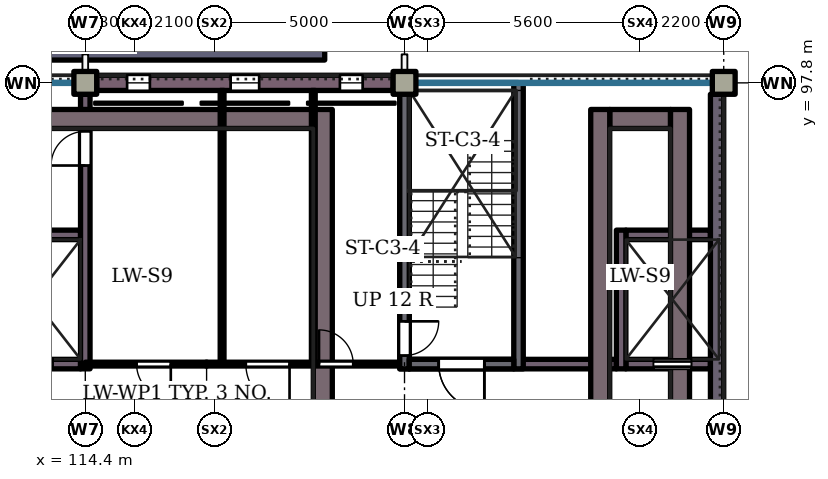
"""IFC4 building model, lengths in metres.
Left out: names, types, materials, properties, quantities, classifications, styles, units other than length and angle.
Written with IfcOpenShell. Run it as: python <this file> out.ifc"""

import sys

from ifc_helpers import new_model, si_unit, direction, frame, frame_2d, origin, origin_2d, place, context, subcontext, project, spatial, rectangle, extrude, element, fill, save


model = new_model("IFC4")
c1 = context("Model", 3, precision=1e-05, world=origin(), true_north=direction((0.0, 1.0)))
c2 = subcontext(c1, "Body", "Model", "MODEL_VIEW")
j1 = project(units=[si_unit("LENGTHUNIT", "METRE"), si_unit("PLANEANGLEUNIT", "RADIAN")], contexts=[c1])
p1 = place(None, origin())
s1 = spatial("IfcSite", under=j1, at=p1, CompositionType="ELEMENT")
p2 = place(p1, origin())
s2 = spatial("IfcBuilding", under=s1, at=p2, CompositionType="ELEMENT")
p3 = place(p2, frame((0.0, 0.0, 16.8)))
s3 = spatial("IfcBuildingStorey", under=s2, at=p3, CompositionType="ELEMENT", Elevation=16.8)
for number, where, z_axis, x_axis in (
    (1, (114.4, 97.8, 0.0), (0.0, 0.0, 1.0), (1.0, 0.0, 0.0)),
    (2, (122.8, 97.8, 0.0), (0.0, 0.0, 1.0), (1.0, 0.0, 0.0)),
    (3, (131.2, 97.8, 0.0), (0.0, 0.0, 1.0), (1.0, 0.0, 0.0)),
):
    element("IfcColumn", number, at=place(p3, frame(where, z_axis=z_axis, x_axis=x_axis)), inside=s3, PredefinedType="COLUMN", context=c2, shape_type="SweptSolid", body=[
        extrude(rectangle(XDim=0.6, YDim=0.6, at=origin_2d()), origin(), (0.0, 0.0, 1.0), 4.2),
    ])
p4 = place(p3, frame((111.825, 90.4, 0.0), z_axis=(0.0, 0.0, 1.0), x_axis=(1.0, 0.0, 0.0)))
e4 = element("IfcWall", 4, at=p4, inside=s3, PredefinedType="SHEAR", context=c2, shape_type="SweptSolid", body=[
    extrude(rectangle(XDim=2.45, YDim=0.25, at=frame_2d((1.225, 0.0))), origin(), (0.0, 0.0, 1.0), 4.2),
])
p5 = place(p4, frame((0.725, 0.0, 0.0)))
e5 = element("IfcOpeningElement", 5, at=p5, cuts=e4, PredefinedType="OPENING", context=c2, shape_type="SweptSolid", body=[
    extrude(rectangle(XDim=1.0, YDim=2.1, at=frame_2d((0.5, 1.05))), frame((0.0, 0.135, 0.0), z_axis=(0.0, -1.0, 0.0), x_axis=(1.0, 0.0, 0.0)), (0.0, 0.0, 1.0), 0.27),
])
p6 = place(p3, frame((122.925, 90.4, 0.0), z_axis=(0.0, 0.0, 1.0), x_axis=(1.0, 0.0, 0.0)))
e6 = element("IfcWall", 6, at=p6, inside=s3, PredefinedType="SHEAR", context=c2, shape_type="SweptSolid", body=[
    extrude(rectangle(XDim=5.45, YDim=0.25, at=frame_2d((2.725, 0.0))), origin(), (0.0, 0.0, 1.0), 4.2),
])
p7 = place(p6, frame((0.775, 0.0, 0.0)))
e7 = element("IfcOpeningElement", 7, at=p7, cuts=e6, PredefinedType="OPENING", context=c2, shape_type="SweptSolid", body=[
    extrude(rectangle(XDim=1.2, YDim=2.1, at=frame_2d((0.6, 1.05))), frame((0.0, 0.135, 0.0), z_axis=(0.0, -1.0, 0.0), x_axis=(1.0, 0.0, 0.0)), (0.0, 0.0, 1.0), 0.27),
])
p8 = place(p3, frame((128.625, 90.4, 0.0), z_axis=(0.0, 0.0, 1.0), x_axis=(1.0, 0.0, 0.0)))
e8 = element("IfcWall", 8, at=p8, inside=s3, PredefinedType="SHEAR", context=c2, shape_type="SweptSolid", body=[
    extrude(rectangle(XDim=2.225, YDim=0.25, at=frame_2d((1.113, 0.0))), origin(), (0.0, 0.0, 1.0), 4.2),
])
p9 = place(p8, frame((0.725, 0.0, 0.0)))
e9 = element("IfcOpeningElement", 9, at=p9, cuts=e8, PredefinedType="OPENING", context=c2, shape_type="SweptSolid", body=[
    extrude(rectangle(XDim=1.0, YDim=2.1, at=frame_2d((0.5, 1.05))), frame((0.0, 0.135, 0.0), z_axis=(0.0, -1.0, 0.0), x_axis=(1.0, 0.0, 0.0)), (0.0, 0.0, 1.0), 0.27),
])
p10 = place(p3, frame((111.825, 93.8, 0.0), z_axis=(0.0, 0.0, 1.0), x_axis=(1.0, 0.0, 0.0)))
e10 = element("IfcWall", 10, at=p10, inside=s3, PredefinedType="SHEAR", context=c2, shape_type="SweptSolid", body=[
    extrude(rectangle(XDim=2.45, YDim=0.25, at=frame_2d((1.225, 0.0))), origin(), (0.0, 0.0, 1.0), 4.2),
])
p11 = place(p3, frame((128.625, 93.8, 0.0), z_axis=(0.0, 0.0, 1.0), x_axis=(1.0, 0.0, 0.0)))
e11 = element("IfcWall", 11, at=p11, inside=s3, PredefinedType="SHEAR", context=c2, shape_type="SweptSolid", body=[
    extrude(rectangle(XDim=2.225, YDim=0.25, at=frame_2d((1.113, 0.0))), origin(), (0.0, 0.0, 1.0), 4.2),
])
p12 = place(p3, frame((114.4, 90.275, 0.0), z_axis=(0.0, 0.0, 1.0), x_axis=(0.0, 1.0, 0.0)))
e12 = element("IfcWall", 12, at=p12, inside=s3, PredefinedType="SHEAR", context=c2, shape_type="SweptSolid", body=[
    extrude(rectangle(XDim=7.225, YDim=0.25, at=frame_2d((3.613, 0.0))), origin(), (0.0, 0.0, 1.0), 4.2),
])
p13 = place(p12, frame((5.35, 0.0, 0.0)))
e13 = element("IfcOpeningElement", 13, at=p13, cuts=e12, PredefinedType="OPENING", context=c2, shape_type="SweptSolid", body=[
    extrude(rectangle(XDim=0.9, YDim=2.1, at=frame_2d((0.45, 1.05))), frame((0.0, 0.135, 0.0), z_axis=(0.0, -1.0, 0.0), x_axis=(1.0, 0.0, 0.0)), (0.0, 0.0, 1.0), 0.27),
])
p14 = place(p3, frame((122.8, 90.275, 0.0), z_axis=(0.0, 0.0, 1.0), x_axis=(0.0, 1.0, 0.0)))
e14 = element("IfcWall", 14, at=p14, inside=s3, PredefinedType="SHEAR", context=c2, shape_type="SweptSolid", body=[
    extrude(rectangle(XDim=7.225, YDim=0.25, at=frame_2d((3.613, 0.0))), origin(), (0.0, 0.0, 1.0), 4.2),
])
p15 = place(p14, frame((0.35, 0.0, 0.0)))
e15 = element("IfcOpeningElement", 15, at=p15, cuts=e14, PredefinedType="OPENING", context=c2, shape_type="SweptSolid", body=[
    extrude(rectangle(XDim=0.9, YDim=2.1, at=frame_2d((0.45, 1.05))), frame((0.0, 0.135, 0.0), z_axis=(0.0, -1.0, 0.0), x_axis=(1.0, 0.0, 0.0)), (0.0, 0.0, 1.0), 0.27),
])
p16 = place(p3, frame((128.5, 90.275, 0.0), z_axis=(0.0, 0.0, 1.0), x_axis=(0.0, 1.0, 0.0)))
e16 = element("IfcWall", 16, at=p16, inside=s3, PredefinedType="SHEAR", context=c2, shape_type="SweptSolid", body=[
    extrude(rectangle(XDim=3.65, YDim=0.25, at=frame_2d((1.825, 0.0))), origin(), (0.0, 0.0, 1.0), 4.2),
])
p17 = place(p3, frame((131.025, 97.5, 0.0), z_axis=(0.0, 0.0, 1.0), x_axis=(0.0, -1.0, 0.0)))
e17 = element("IfcWall", 17, at=p17, inside=s3, PredefinedType="SHEAR", context=c2, shape_type="SweptSolid", body=[
    extrude(rectangle(XDim=9.6, YDim=0.35, at=frame_2d((4.8, 0.0))), origin(), (0.0, 0.0, 1.0), 4.2),
])
p18 = place(p3, frame((114.7, 97.8, 0.0), z_axis=(0.0, 0.0, 1.0), x_axis=(1.0, 0.0, 0.0)))
e18 = element("IfcWall", 18, at=p18, inside=s3, PredefinedType="SOLIDWALL", context=c2, shape_type="SweptSolid", body=[
    extrude(rectangle(XDim=7.8, YDim=0.4, at=frame_2d((3.9, 0.0))), origin(), (0.0, 0.0, 1.0), 3.3),
])
p19 = place(p18, frame((0.8, 0.0, 2.1)))
e19 = element("IfcOpeningElement", 19, at=p19, cuts=e18, PredefinedType="OPENING", context=c2, shape_type="SweptSolid", body=[
    extrude(rectangle(XDim=0.6, YDim=0.9, at=frame_2d((0.3, 0.45))), frame((0.0, 0.21, 0.0), z_axis=(0.0, -1.0, 0.0), x_axis=(1.0, 0.0, 0.0)), (0.0, 0.0, 1.0), 0.42),
])
p20 = place(p18, frame((3.525, 0.0, 2.1)))
e20 = element("IfcOpeningElement", 20, at=p20, cuts=e18, PredefinedType="OPENING", context=c2, shape_type="SweptSolid", body=[
    extrude(rectangle(XDim=0.75, YDim=0.9, at=frame_2d((0.375, 0.45))), frame((0.0, 0.21, 0.0), z_axis=(0.0, -1.0, 0.0), x_axis=(1.0, 0.0, 0.0)), (0.0, 0.0, 1.0), 0.42),
])
p21 = place(p18, frame((6.4, 0.0, 2.1)))
e21 = element("IfcOpeningElement", 21, at=p21, cuts=e18, PredefinedType="OPENING", context=c2, shape_type="SweptSolid", body=[
    extrude(rectangle(XDim=0.6, YDim=0.9, at=frame_2d((0.3, 0.45))), frame((0.0, 0.21, 0.0), z_axis=(0.0, -1.0, 0.0), x_axis=(1.0, 0.0, 0.0)), (0.0, 0.0, 1.0), 0.42),
])
p22 = place(p3, frame((128.2, 96.85, 4.2), z_axis=(0.0, 0.0, 1.0), x_axis=(1.0, 0.0, 0.0)))
e22 = element("IfcWall", 22, at=p22, inside=s3, PredefinedType="SOLIDWALL", context=c2, shape_type="SweptSolid", body=[
    extrude(rectangle(XDim=1.6, YDim=0.5, at=frame_2d((0.8, 0.0))), origin(), (0.0, 0.0, 1.0), 0.9),
])
for number, where, z_axis, x_axis in (
    (23, (127.95, 88.3, 4.2), (0.0, 0.0, 1.0), (0.0, 1.0, 0.0)),
    (24, (130.05, 88.3, 4.2), (0.0, 0.0, 1.0), (0.0, 1.0, 0.0)),
):
    element("IfcWall", number, at=place(p3, frame(where, z_axis=z_axis, x_axis=x_axis)), inside=s3, PredefinedType="SOLIDWALL", context=c2, shape_type="SweptSolid", body=[
        extrude(rectangle(XDim=8.8, YDim=0.5, at=frame_2d((4.4, 0.0))), origin(), (0.0, 0.0, 1.0), 0.9),
    ])
p23 = place(p3, frame((111.4, 96.85, 4.2), z_axis=(0.0, 0.0, 1.0), x_axis=(1.0, 0.0, 0.0)))
e25 = element("IfcWall", 25, at=p23, inside=s3, PredefinedType="SOLIDWALL", context=c2, shape_type="SweptSolid", body=[
    extrude(rectangle(XDim=9.0, YDim=0.5, at=frame_2d((4.5, 0.0))), origin(), (0.0, 0.0, 1.0), 0.9),
])
p24 = place(p3, frame((120.65, 88.3, 4.2), z_axis=(0.0, 0.0, 1.0), x_axis=(0.0, 1.0, 0.0)))
e26 = element("IfcWall", 26, at=p24, inside=s3, PredefinedType="SOLIDWALL", context=c2, shape_type="SweptSolid", body=[
    extrude(rectangle(XDim=8.8, YDim=0.5, at=frame_2d((4.4, 0.0))), origin(), (0.0, 0.0, 1.0), 0.9),
])
p25 = place(p3, frame((108.1, 98.9, 0.0), z_axis=(0.0, 0.0, 1.0), x_axis=(1.0, 0.0, 0.0)))
e27 = element("IfcWall", 27, at=p25, inside=s3, PredefinedType="STANDARD", context=c2, shape_type="SweptSolid", body=[
    extrude(rectangle(XDim=12.6, YDim=1.0, at=frame_2d((6.3, 0.0))), origin(), (0.0, 0.0, 1.0), 0.6),
])
p26 = place(p3, frame((114.4, 90.4, 0.0), z_axis=(0.0, 0.0, 1.0), x_axis=(1.0, 0.0, 0.0)))
e28 = element("IfcWall", 28, at=p26, inside=s3, PredefinedType="PARTITIONING", context=c2, shape_type="SweptSolid", body=[
    extrude(rectangle(XDim=8.4, YDim=0.1, at=frame_2d((4.2, 0.0))), origin(), (0.0, 0.0, 1.0), 3.9),
])
p27 = place(p26, frame((1.35, 0.0, 0.0)))
e29 = element("IfcOpeningElement", 29, at=p27, cuts=e28, PredefinedType="OPENING", context=c2, shape_type="SweptSolid", body=[
    extrude(rectangle(XDim=0.9, YDim=2.1, at=frame_2d((0.45, 1.05))), frame((0.0, 0.06, 0.0), z_axis=(0.0, -1.0, 0.0), x_axis=(1.0, 0.0, 0.0)), (0.0, 0.0, 1.0), 0.12),
])
p28 = place(p26, frame((4.225, 0.0, 0.0)))
e30 = element("IfcOpeningElement", 30, at=p28, cuts=e28, PredefinedType="OPENING", context=c2, shape_type="SweptSolid", body=[
    extrude(rectangle(XDim=1.15, YDim=2.1, at=frame_2d((0.575, 1.05))), frame((0.0, 0.06, 0.0), z_axis=(0.0, -1.0, 0.0), x_axis=(1.0, 0.0, 0.0)), (0.0, 0.0, 1.0), 0.12),
])
p29 = place(p26, frame((6.15, 0.0, 0.0)))
e31 = element("IfcOpeningElement", 31, at=p29, cuts=e28, PredefinedType="OPENING", context=c2, shape_type="SweptSolid", body=[
    extrude(rectangle(XDim=0.9, YDim=2.1, at=frame_2d((0.45, 1.05))), frame((0.0, 0.06, 0.0), z_axis=(0.0, -1.0, 0.0), x_axis=(1.0, 0.0, 0.0)), (0.0, 0.0, 1.0), 0.12),
])
for number, where, z_axis, x_axis in (
    (32, (118.0, 90.4, 0.0), (0.0, 0.0, 1.0), (0.0, 1.0, 0.0)),
    (33, (120.4, 90.4, 0.0), (0.0, 0.0, 1.0), (0.0, 1.0, 0.0)),
):
    element("IfcWall", number, at=place(p3, frame(where, z_axis=z_axis, x_axis=x_axis)), inside=s3, PredefinedType="PARTITIONING", context=c2, shape_type="SweptSolid", body=[
        extrude(rectangle(XDim=7.2, YDim=0.1, at=frame_2d((3.6, 0.0))), origin(), (0.0, 0.0, 1.0), 3.9),
    ])
p30 = place(p3, frame((125.8, 93.2, 0.0), z_axis=(0.0, 0.0, 1.0), x_axis=(0.0, 1.0, 0.0)))
e34 = element("IfcWall", 34, at=p30, inside=s3, PredefinedType="PARTITIONING", context=c2, shape_type="SweptSolid", body=[
    extrude(rectangle(XDim=4.4, YDim=0.15, at=frame_2d((2.2, 0.0))), origin(), (0.0, 0.0, 1.0), 3.9),
])
for number, where, z_axis, x_axis in (
    (35, (122.8, 90.275, 4.2), (0.0, 0.0, 1.0), (0.0, 1.0, 0.0)),
    (36, (125.8, 90.275, 4.2), (0.0, 0.0, 1.0), (0.0, 1.0, 0.0)),
):
    element("IfcWall", number, at=place(p3, frame(where, z_axis=z_axis, x_axis=x_axis)), inside=s3, PredefinedType="SHEAR", context=c2, shape_type="SweptSolid", body=[
        extrude(rectangle(XDim=7.525, YDim=0.25, at=frame_2d((3.763, 0.0))), origin(), (0.0, 0.0, 1.0), 4.2),
    ])
p31 = place(p3, frame((122.925, 90.4, 4.2), z_axis=(0.0, 0.0, 1.0), x_axis=(1.0, 0.0, 0.0)))
e37 = element("IfcWall", 37, at=p31, inside=s3, PredefinedType="SHEAR", context=c2, shape_type="SweptSolid", body=[
    extrude(rectangle(XDim=2.75, YDim=0.25, at=frame_2d((1.375, 0.0))), origin(), (0.0, 0.0, 1.0), 4.2),
])
p32 = place(p31, frame((0.775, 0.0, 0.0)))
e38 = element("IfcOpeningElement", 38, at=p32, cuts=e37, PredefinedType="OPENING", context=c2, shape_type="SweptSolid", body=[
    extrude(rectangle(XDim=1.2, YDim=2.1, at=frame_2d((0.6, 1.05))), frame((0.0, 0.135, 0.0), z_axis=(0.0, -1.0, 0.0), x_axis=(1.0, 0.0, 0.0)), (0.0, 0.0, 1.0), 0.27),
])
p33 = place(p19, origin())
e39 = element("IfcWindow", 39, at=p33, inside=s3, PartitioningType="SINGLE_PANEL", PredefinedType="WINDOW", context=c2, shape_type="SweptSolid", body=[
    extrude(rectangle(XDim=0.6, YDim=0.9, at=frame_2d((0.3, 0.45))), frame((0.0, 0.03, 0.0), z_axis=(0.0, -1.0, 0.0), x_axis=(1.0, 0.0, 0.0)), (0.0, 0.0, 1.0), 0.06),
])
fill(e19, e39)
p34 = place(p20, origin())
e40 = element("IfcWindow", 40, at=p34, inside=s3, PartitioningType="SINGLE_PANEL", PredefinedType="WINDOW", context=c2, shape_type="SweptSolid", body=[
    extrude(rectangle(XDim=0.75, YDim=0.9, at=frame_2d((0.375, 0.45))), frame((0.0, 0.03, 0.0), z_axis=(0.0, -1.0, 0.0), x_axis=(1.0, 0.0, 0.0)), (0.0, 0.0, 1.0), 0.06),
])
fill(e20, e40)
p35 = place(p21, origin())
e41 = element("IfcWindow", 41, at=p35, inside=s3, PartitioningType="SINGLE_PANEL", PredefinedType="WINDOW", context=c2, shape_type="SweptSolid", body=[
    extrude(rectangle(XDim=0.6, YDim=0.9, at=frame_2d((0.3, 0.45))), frame((0.0, 0.03, 0.0), z_axis=(0.0, -1.0, 0.0), x_axis=(1.0, 0.0, 0.0)), (0.0, 0.0, 1.0), 0.06),
])
fill(e21, e41)
p36 = place(p27, origin())
e42 = element("IfcDoor", 42, at=p36, inside=s3, OperationType="SINGLE_SWING_RIGHT", PredefinedType="DOOR", context=c2, shape_type="SweptSolid", body=[
    extrude(rectangle(XDim=0.9, YDim=2.1, at=frame_2d((0.45, 1.05))), frame((0.0, 0.025, 0.0), z_axis=(0.0, -1.0, 0.0), x_axis=(1.0, 0.0, 0.0)), (0.0, 0.0, 1.0), 0.05),
])
fill(e29, e42)
p37 = place(p13, origin())
e43 = element("IfcDoor", 43, at=p37, inside=s3, OperationType="SINGLE_SWING_LEFT", PredefinedType="DOOR", context=c2, shape_type="SweptSolid", body=[
    extrude(rectangle(XDim=0.9, YDim=2.1, at=frame_2d((0.45, 1.05))), frame((0.0, 0.025, 0.0), z_axis=(0.0, -1.0, 0.0), x_axis=(1.0, 0.0, 0.0)), (0.0, 0.0, 1.0), 0.05),
])
fill(e13, e43)
p38 = place(p28, origin())
e44 = element("IfcDoor", 44, at=p38, inside=s3, OperationType="SINGLE_SWING_RIGHT", PredefinedType="DOOR", context=c2, shape_type="SweptSolid", body=[
    extrude(rectangle(XDim=1.15, YDim=2.1, at=frame_2d((0.575, 1.05))), frame((0.0, 0.025, 0.0), z_axis=(0.0, -1.0, 0.0), x_axis=(1.0, 0.0, 0.0)), (0.0, 0.0, 1.0), 0.05),
])
fill(e30, e44)
p39 = place(p29, origin())
e45 = element("IfcDoor", 45, at=p39, inside=s3, OperationType="SINGLE_SWING_LEFT", PredefinedType="DOOR", context=c2, shape_type="SweptSolid", body=[
    extrude(rectangle(XDim=0.9, YDim=2.1, at=frame_2d((0.45, 1.05))), frame((0.0, 0.025, 0.0), z_axis=(0.0, -1.0, 0.0), x_axis=(1.0, 0.0, 0.0)), (0.0, 0.0, 1.0), 0.05),
])
fill(e31, e45)
p40 = place(p15, origin())
e46 = element("IfcDoor", 46, at=p40, inside=s3, OperationType="SINGLE_SWING_RIGHT", PredefinedType="DOOR", context=c2, shape_type="SweptSolid", body=[
    extrude(rectangle(XDim=0.9, YDim=2.1, at=frame_2d((0.45, 1.05))), frame((0.0, 0.025, 0.0), z_axis=(0.0, -1.0, 0.0), x_axis=(1.0, 0.0, 0.0)), (0.0, 0.0, 1.0), 0.05),
])
fill(e15, e46)
p41 = place(p5, origin())
e47 = element("IfcDoor", 47, at=p41, inside=s3, OperationType="SLIDING_TO_LEFT", PredefinedType="DOOR", context=c2, shape_type="SweptSolid", body=[
    extrude(rectangle(XDim=1.0, YDim=2.1, at=frame_2d((0.5, 1.05))), frame((0.0, 0.025, 0.0), z_axis=(0.0, -1.0, 0.0), x_axis=(1.0, 0.0, 0.0)), (0.0, 0.0, 1.0), 0.05),
])
fill(e5, e47)
p42 = place(p7, origin())
e48 = element("IfcDoor", 48, at=p42, inside=s3, OperationType="SINGLE_SWING_RIGHT", PredefinedType="DOOR", context=c2, shape_type="SweptSolid", body=[
    extrude(rectangle(XDim=1.2, YDim=2.1, at=frame_2d((0.6, 1.05))), frame((0.0, 0.025, 0.0), z_axis=(0.0, -1.0, 0.0), x_axis=(1.0, 0.0, 0.0)), (0.0, 0.0, 1.0), 0.05),
])
fill(e7, e48)
p43 = place(p9, origin())
e49 = element("IfcDoor", 49, at=p43, inside=s3, OperationType="SLIDING_TO_LEFT", PredefinedType="DOOR", context=c2, shape_type="SweptSolid", body=[
    extrude(rectangle(XDim=1.0, YDim=2.1, at=frame_2d((0.5, 1.05))), frame((0.0, 0.025, 0.0), z_axis=(0.0, -1.0, 0.0), x_axis=(1.0, 0.0, 0.0)), (0.0, 0.0, 1.0), 0.05),
])
fill(e9, e49)
p44 = place(p32, origin())
e50 = element("IfcDoor", 50, at=p44, inside=s3, OperationType="SINGLE_SWING_RIGHT", PredefinedType="DOOR", context=c2, shape_type="SweptSolid", body=[
    extrude(rectangle(XDim=1.2, YDim=2.1, at=frame_2d((0.6, 1.05))), frame((0.0, 0.025, 0.0), z_axis=(0.0, -1.0, 0.0), x_axis=(1.0, 0.0, 0.0)), (0.0, 0.0, 1.0), 0.05),
])
fill(e38, e50)
save(model, sys.argv[1])
